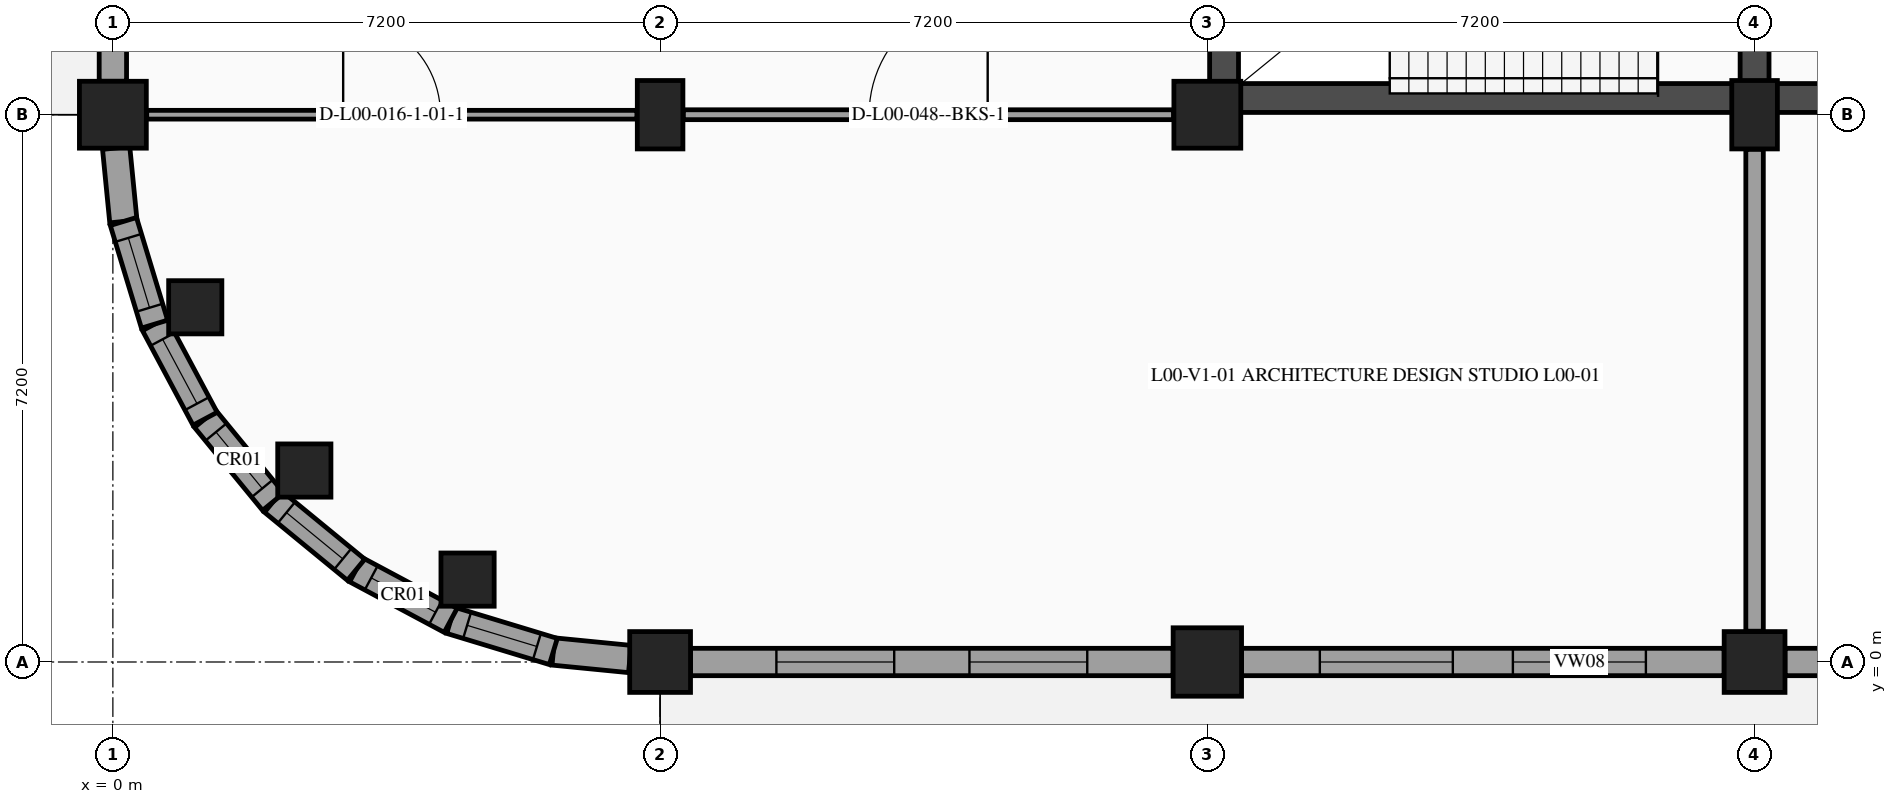
"""IFC4 building model, lengths in metres.
Left out: names, types, materials, properties, quantities, classifications, styles, units other than length and angle.
Written with IfcOpenShell. Run it as: python <this file> out.ifc"""

import sys

from ifc_helpers import new_model, si_unit, direction, frame, frame_2d, origin, origin_2d, place, context, subcontext, project, spatial, rectangle, circle, extrude, element, fill, save


model = new_model("IFC4")
c1 = context("Model", 3, precision=1e-05, world=origin(), true_north=direction((0.0, 1.0)))
c2 = subcontext(c1, "Body", "Model", "MODEL_VIEW")
j1 = project(units=[si_unit("LENGTHUNIT", "METRE"), si_unit("PLANEANGLEUNIT", "RADIAN")], contexts=[c1])
p1 = place(None, origin())
s1 = spatial("IfcSite", under=j1, at=p1, CompositionType="ELEMENT")
p2 = place(p1, origin())
s2 = spatial("IfcBuilding", under=s1, at=p2, CompositionType="ELEMENT")
p3 = place(p2, origin())
s3 = spatial("IfcBuildingStorey", under=s2, at=p3, CompositionType="ELEMENT", Elevation=0.0)
p4 = place(p3, frame((0.0, 7.2, 0.0), z_axis=(0.0, 0.0, 1.0), x_axis=(1.0, 0.0, 0.0)))
e1 = element("IfcColumn", 1, at=p4, inside=s3, PredefinedType="COLUMN", context=c2, shape_type="SweptSolid", body=[
    extrude(rectangle(XDim=0.88, YDim=0.88, at=origin_2d()), origin(), (0.0, 0.0, 1.0), 5.4),
])
p5 = place(p3, frame((7.2, 0.0, 0.0), z_axis=(0.0, 0.0, 1.0), x_axis=(1.0, 0.0, 0.0)))
e2 = element("IfcColumn", 2, at=p5, inside=s3, PredefinedType="COLUMN", context=c2, shape_type="SweptSolid", body=[
    extrude(rectangle(XDim=0.8, YDim=0.8, at=origin_2d()), origin(), (0.0, 0.0, 1.0), 5.4),
])
p6 = place(p3, frame((7.2, 7.2, 0.0), z_axis=(0.0, 0.0, 1.0), x_axis=(1.0, 0.0, 0.0)))
e3 = element("IfcColumn", 3, at=p6, inside=s3, PredefinedType="COLUMN", context=c2, shape_type="SweptSolid", body=[
    extrude(rectangle(XDim=0.6, YDim=0.9, at=origin_2d()), origin(), (0.0, 0.0, 1.0), 5.4),
])
p7 = place(p3, frame((14.4, 0.0, 0.0), z_axis=(0.0, 0.0, 1.0), x_axis=(1.0, 0.0, 0.0)))
e4 = element("IfcColumn", 4, at=p7, inside=s3, PredefinedType="COLUMN", context=c2, shape_type="SweptSolid", body=[
    extrude(rectangle(XDim=0.9, YDim=0.9, at=origin_2d()), origin(), (0.0, 0.0, 1.0), 5.4),
])
p8 = place(p3, frame((14.4, 7.2, 0.0), z_axis=(0.0, 0.0, 1.0), x_axis=(1.0, 0.0, 0.0)))
e5 = element("IfcColumn", 5, at=p8, inside=s3, PredefinedType="COLUMN", context=c2, shape_type="SweptSolid", body=[
    extrude(rectangle(XDim=0.88, YDim=0.88, at=origin_2d()), origin(), (0.0, 0.0, 1.0), 5.4),
])
p9 = place(p3, frame((21.6, 0.0, 0.0), z_axis=(0.0, 0.0, 1.0), x_axis=(1.0, 0.0, 0.0)))
e6 = element("IfcColumn", 6, at=p9, inside=s3, PredefinedType="COLUMN", context=c2, shape_type="SweptSolid", body=[
    extrude(rectangle(XDim=0.8, YDim=0.8, at=origin_2d()), origin(), (0.0, 0.0, 1.0), 5.4),
])
p10 = place(p3, frame((21.6, 7.2, 0.0), z_axis=(0.0, 0.0, 1.0), x_axis=(1.0, 0.0, 0.0)))
e7 = element("IfcColumn", 7, at=p10, inside=s3, PredefinedType="COLUMN", context=c2, shape_type="SweptSolid", body=[
    extrude(rectangle(XDim=0.6, YDim=0.9, at=origin_2d()), origin(), (0.0, 0.0, 1.0), 5.4),
])
for number, where, z_axis, x_axis in (
    (8, (1.084, 4.667, 0.0), (0.0, 0.0, 1.0), (1.0, 0.0, 0.0)),
    (9, (2.519, 2.519, 0.0), (0.0, 0.0, 1.0), (1.0, 0.0, 0.0)),
    (10, (4.667, 1.084, 0.0), (0.0, 0.0, 1.0), (1.0, 0.0, 0.0)),
):
    element("IfcColumn", number, at=place(p3, frame(where, z_axis=z_axis, x_axis=x_axis)), inside=s3, PredefinedType="COLUMN", context=c2, shape_type="SweptSolid", body=[
        extrude(circle(Radius=0.35, at=origin_2d()), origin(), (0.0, 0.0, 1.0), 5.4),
    ])
p11 = place(p3, frame((0.138, 5.795, 0.0), z_axis=(0.0, 0.0, 1.0), x_axis=(-0.098010679686, 0.995185362969, 0.0)))
e11 = element("IfcWall", 11, at=p11, inside=s3, PredefinedType="STANDARD", context=c2, shape_type="SweptSolid", body=[
    extrude(rectangle(XDim=0.971, YDim=0.36, at=frame_2d((0.486, 0.0))), origin(), (0.0, 0.0, 1.0), 5.09),
])
p12 = place(p3, frame((0.0, 7.64, 0.0), z_axis=(0.0, 0.0, 1.0), x_axis=(0.0, 1.0, 0.0)))
e12 = element("IfcWall", 12, at=p12, inside=s3, PredefinedType="STANDARD", context=c2, shape_type="SweptSolid", body=[
    extrude(rectangle(XDim=6.35, YDim=0.36, at=frame_2d((3.175, 0.0))), origin(), (0.0, 0.0, 1.0), 4.335),
])
p13 = place(p12, frame((2.125, 0.0, 0.0)))
e13 = element("IfcOpeningElement", 13, at=p13, cuts=e12, PredefinedType="OPENING", context=c2, shape_type="SweptSolid", body=[
    extrude(rectangle(XDim=2.1, YDim=2.4, at=frame_2d((1.05, 1.2))), frame((0.0, 0.19, 0.0), z_axis=(0.0, -1.0, 0.0), x_axis=(1.0, 0.0, 0.0)), (0.0, 0.0, 1.0), 0.38),
])
p14 = place(p3, frame((28.35, 0.0, 0.0), z_axis=(0.0, 0.0, 1.0), x_axis=(-1.0, 0.0, 0.0)))
e14 = element("IfcWall", 14, at=p14, inside=s3, PredefinedType="STANDARD", context=c2, shape_type="SweptSolid", body=[
    extrude(rectangle(XDim=6.35, YDim=0.36, at=frame_2d((3.175, 0.0))), origin(), (0.0, 0.0, 1.0), 4.37),
])
p15 = place(p14, frame((2.375, 0.0, 0.0)))
e15 = element("IfcOpeningElement", 15, at=p15, cuts=e14, PredefinedType="OPENING", context=c2, shape_type="SweptSolid", body=[
    extrude(rectangle(XDim=1.6, YDim=2.3, at=frame_2d((0.8, 1.15))), frame((0.0, 0.19, 0.0), z_axis=(0.0, -1.0, 0.0), x_axis=(1.0, 0.0, 0.0)), (0.0, 0.0, 1.0), 0.38),
])
p16 = place(p3, frame((21.2, 0.0, 0.0), z_axis=(0.0, 0.0, 1.0), x_axis=(-1.0, 0.0, 0.0)))
e16 = element("IfcWall", 16, at=p16, inside=s3, PredefinedType="STANDARD", context=c2, shape_type="SweptSolid", body=[
    extrude(rectangle(XDim=6.35, YDim=0.36, at=frame_2d((3.175, 0.0))), origin(), (0.0, 0.0, 1.0), 4.37),
])
p17 = place(p16, frame((1.03, 0.0, 1.15)))
e17 = element("IfcOpeningElement", 17, at=p17, cuts=e16, PredefinedType="OPENING", context=c2, shape_type="SweptSolid", body=[
    extrude(rectangle(XDim=1.75, YDim=1.4, at=frame_2d((0.875, 0.7))), frame((0.0, 0.19, 0.0), z_axis=(0.0, -1.0, 0.0), x_axis=(1.0, 0.0, 0.0)), (0.0, 0.0, 1.0), 0.38),
])
p18 = place(p16, frame((3.57, 0.0, 1.15)))
e18 = element("IfcOpeningElement", 18, at=p18, cuts=e16, PredefinedType="OPENING", context=c2, shape_type="SweptSolid", body=[
    extrude(rectangle(XDim=1.75, YDim=1.4, at=frame_2d((0.875, 0.7))), frame((0.0, 0.19, 0.0), z_axis=(0.0, -1.0, 0.0), x_axis=(1.0, 0.0, 0.0)), (0.0, 0.0, 1.0), 0.38),
])
p19 = place(p3, frame((13.95, 0.0, 0.0), z_axis=(0.0, 0.0, 1.0), x_axis=(-1.0, 0.0, 0.0)))
e19 = element("IfcWall", 19, at=p19, inside=s3, PredefinedType="STANDARD", context=c2, shape_type="SweptSolid", body=[
    extrude(rectangle(XDim=6.35, YDim=0.36, at=frame_2d((3.175, 0.0))), origin(), (0.0, 0.0, 1.0), 4.37),
])
p20 = place(p19, frame((1.13, 0.0, 1.15)))
e20 = element("IfcOpeningElement", 20, at=p20, cuts=e19, PredefinedType="OPENING", context=c2, shape_type="SweptSolid", body=[
    extrude(rectangle(XDim=1.55, YDim=1.35, at=frame_2d((0.775, 0.675))), frame((0.0, 0.19, 0.0), z_axis=(0.0, -1.0, 0.0), x_axis=(1.0, 0.0, 0.0)), (0.0, 0.0, 1.0), 0.38),
])
p21 = place(p19, frame((3.67, 0.0, 1.15)))
e21 = element("IfcOpeningElement", 21, at=p21, cuts=e19, PredefinedType="OPENING", context=c2, shape_type="SweptSolid", body=[
    extrude(rectangle(XDim=1.55, YDim=1.35, at=frame_2d((0.775, 0.675))), frame((0.0, 0.19, 0.0), z_axis=(0.0, -1.0, 0.0), x_axis=(1.0, 0.0, 0.0)), (0.0, 0.0, 1.0), 0.38),
])
p22 = place(p3, frame((6.802, 0.039, 0.0), z_axis=(0.0, 0.0, 1.0), x_axis=(-0.9951866114, 0.097998002481, 0.0)))
e22 = element("IfcWall", 22, at=p22, inside=s3, PredefinedType="STANDARD", context=c2, shape_type="SweptSolid", body=[
    extrude(rectangle(XDim=1.011, YDim=0.36, at=frame_2d((0.506, 0.0))), origin(), (0.0, 0.0, 1.0), 5.09),
])
p23 = place(p3, frame((5.795, 0.138, 0.0), z_axis=(0.0, 0.0, 1.0), x_axis=(-0.95696037757, 0.290218599957, 0.0)))
e23 = element("IfcWall", 23, at=p23, inside=s3, PredefinedType="STANDARD", context=c2, shape_type="SweptSolid", body=[
    extrude(rectangle(XDim=1.412, YDim=0.36, at=frame_2d((0.706, 0.0))), origin(), (0.0, 0.0, 1.0), 5.09),
])
p24 = place(p23, frame((0.226, 0.0, 1.0)))
e24 = element("IfcOpeningElement", 24, at=p24, cuts=e23, PredefinedType="OPENING", context=c2, shape_type="SweptSolid", body=[
    extrude(rectangle(XDim=0.96, YDim=1.4, at=frame_2d((0.48, 0.7))), frame((0.0, 0.19, 0.0), z_axis=(0.0, -1.0, 0.0), x_axis=(1.0, 0.0, 0.0)), (0.0, 0.0, 1.0), 0.38),
])
p25 = place(p3, frame((4.445, 0.548, 0.0), z_axis=(0.0, 0.0, 1.0), x_axis=(-0.881916788861, 0.471405109778, 0.0)))
e25 = element("IfcWall", 25, at=p25, inside=s3, PredefinedType="STANDARD", context=c2, shape_type="SweptSolid", body=[
    extrude(rectangle(XDim=1.411, YDim=0.36, at=frame_2d((0.706, 0.0))), origin(), (0.0, 0.0, 1.0), 5.09),
])
p26 = place(p25, frame((0.226, 0.0, 1.0)))
e26 = element("IfcOpeningElement", 26, at=p26, cuts=e25, PredefinedType="OPENING", context=c2, shape_type="SweptSolid", body=[
    extrude(rectangle(XDim=0.96, YDim=1.4, at=frame_2d((0.48, 0.7))), frame((0.0, 0.19, 0.0), z_axis=(0.0, -1.0, 0.0), x_axis=(1.0, 0.0, 0.0)), (0.0, 0.0, 1.0), 0.38),
])
p27 = place(p3, frame((3.2, 1.213, 0.0), z_axis=(0.0, 0.0, 1.0), x_axis=(-0.772977670605, 0.634433227965, 0.0)))
e27 = element("IfcWall", 27, at=p27, inside=s3, PredefinedType="STANDARD", context=c2, shape_type="SweptSolid", body=[
    extrude(rectangle(XDim=1.412, YDim=0.36, at=frame_2d((0.706, 0.0))), origin(), (0.0, 0.0, 1.0), 5.09),
])
p28 = place(p27, frame((0.226, 0.0, 1.0)))
e28 = element("IfcOpeningElement", 28, at=p28, cuts=e27, PredefinedType="OPENING", context=c2, shape_type="SweptSolid", body=[
    extrude(rectangle(XDim=0.96, YDim=1.4, at=frame_2d((0.48, 0.7))), frame((0.0, 0.19, 0.0), z_axis=(0.0, -1.0, 0.0), x_axis=(1.0, 0.0, 0.0)), (0.0, 0.0, 1.0), 0.38),
])
p29 = place(p3, frame((2.109, 2.109, 0.0), z_axis=(0.0, 0.0, 1.0), x_axis=(-0.634433227965, 0.772977670605, 0.0)))
e29 = element("IfcWall", 29, at=p29, inside=s3, PredefinedType="STANDARD", context=c2, shape_type="SweptSolid", body=[
    extrude(rectangle(XDim=1.412, YDim=0.36, at=frame_2d((0.706, 0.0))), origin(), (0.0, 0.0, 1.0), 5.09),
])
p30 = place(p29, frame((0.226, 0.0, 1.0)))
e30 = element("IfcOpeningElement", 30, at=p30, cuts=e29, PredefinedType="OPENING", context=c2, shape_type="SweptSolid", body=[
    extrude(rectangle(XDim=0.96, YDim=1.4, at=frame_2d((0.48, 0.7))), frame((0.0, 0.19, 0.0), z_axis=(0.0, -1.0, 0.0), x_axis=(1.0, 0.0, 0.0)), (0.0, 0.0, 1.0), 0.38),
])
p31 = place(p3, frame((1.213, 3.2, 0.0), z_axis=(0.0, 0.0, 1.0), x_axis=(-0.471405109778, 0.881916788861, 0.0)))
e31 = element("IfcWall", 31, at=p31, inside=s3, PredefinedType="STANDARD", context=c2, shape_type="SweptSolid", body=[
    extrude(rectangle(XDim=1.411, YDim=0.36, at=frame_2d((0.706, 0.0))), origin(), (0.0, 0.0, 1.0), 5.09),
])
p32 = place(p31, frame((0.226, 0.0, 1.0)))
e32 = element("IfcOpeningElement", 32, at=p32, cuts=e31, PredefinedType="OPENING", context=c2, shape_type="SweptSolid", body=[
    extrude(rectangle(XDim=0.96, YDim=1.4, at=frame_2d((0.48, 0.7))), frame((0.0, 0.19, 0.0), z_axis=(0.0, -1.0, 0.0), x_axis=(1.0, 0.0, 0.0)), (0.0, 0.0, 1.0), 0.38),
])
p33 = place(p3, frame((0.548, 4.445, 0.0), z_axis=(0.0, 0.0, 1.0), x_axis=(-0.290218599957, 0.95696037757, 0.0)))
e33 = element("IfcWall", 33, at=p33, inside=s3, PredefinedType="STANDARD", context=c2, shape_type="SweptSolid", body=[
    extrude(rectangle(XDim=1.412, YDim=0.36, at=frame_2d((0.706, 0.0))), origin(), (0.0, 0.0, 1.0), 5.09),
])
p34 = place(p33, frame((0.226, 0.0, 1.0)))
e34 = element("IfcOpeningElement", 34, at=p34, cuts=e33, PredefinedType="OPENING", context=c2, shape_type="SweptSolid", body=[
    extrude(rectangle(XDim=0.96, YDim=1.4, at=frame_2d((0.48, 0.7))), frame((0.0, 0.19, 0.0), z_axis=(0.0, -1.0, 0.0), x_axis=(1.0, 0.0, 0.0)), (0.0, 0.0, 1.0), 0.38),
])
p35 = place(p3, frame((14.81, 7.42, 0.0), z_axis=(0.0, 0.0, 1.0), x_axis=(1.0, 0.0, 0.0)))
e35 = element("IfcWall", 35, at=p35, inside=s3, PredefinedType="SHEAR", context=c2, shape_type="SweptSolid", body=[
    extrude(rectangle(XDim=6.6, YDim=0.38, at=frame_2d((3.3, 0.0))), origin(), (0.0, 0.0, 1.0), 5.09),
])
p36 = place(p3, frame((14.62, 14.37, 0.0), z_axis=(0.0, 0.0, 1.0), x_axis=(0.0, -1.0, 0.0)))
e36 = element("IfcWall", 36, at=p36, inside=s3, PredefinedType="SHEAR", context=c2, shape_type="SweptSolid", body=[
    extrude(rectangle(XDim=7.14, YDim=0.38, at=frame_2d((3.57, 0.0))), origin(), (0.0, 0.0, 1.0), 5.09),
])
p37 = place(p3, frame((21.6, 7.23, 0.0), z_axis=(0.0, 0.0, 1.0), x_axis=(0.0, 1.0, 0.0)))
e37 = element("IfcWall", 37, at=p37, inside=s3, PredefinedType="SHEAR", context=c2, shape_type="SweptSolid", body=[
    extrude(rectangle(XDim=7.14, YDim=0.38, at=frame_2d((3.57, 0.0))), origin(), (0.0, 0.0, 1.0), 5.09),
])
p38 = place(p37, frame((1.4, 0.0, 0.0)))
e38 = element("IfcOpeningElement", 38, at=p38, cuts=e37, PredefinedType="OPENING", context=c2, shape_type="SweptSolid", body=[
    extrude(rectangle(XDim=1.8, YDim=2.2, at=frame_2d((0.9, 1.1))), frame((0.0, 0.2, 0.0), z_axis=(0.0, -1.0, 0.0), x_axis=(1.0, 0.0, 0.0)), (0.0, 0.0, 1.0), 0.4),
])
p39 = place(p3, frame((21.79, 7.42, 0.0), z_axis=(0.0, 0.0, 1.0), x_axis=(1.0, 0.0, 0.0)))
e39 = element("IfcWall", 39, at=p39, inside=s3, PredefinedType="SHEAR", context=c2, shape_type="SweptSolid", body=[
    extrude(rectangle(XDim=6.6, YDim=0.38, at=frame_2d((3.3, 0.0))), origin(), (0.0, 0.0, 1.0), 5.09),
])
p40 = place(p39, frame((2.22, 0.0, 0.0)))
e40 = element("IfcOpeningElement", 40, at=p40, cuts=e39, PredefinedType="OPENING", context=c2, shape_type="SweptSolid", body=[
    extrude(rectangle(XDim=1.8, YDim=2.2, at=frame_2d((0.9, 1.1))), frame((0.0, 0.2, 0.0), z_axis=(0.0, -1.0, 0.0), x_axis=(1.0, 0.0, 0.0)), (0.0, 0.0, 1.0), 0.4),
])
p41 = place(p3, frame((0.445, 7.2, 0.0), z_axis=(0.0, 0.0, 1.0), x_axis=(1.0, 0.0, 0.0)))
e41 = element("IfcWall", 41, at=p41, inside=s3, PredefinedType="PARTITIONING", context=c2, shape_type="SweptSolid", body=[
    extrude(rectangle(XDim=6.45, YDim=0.115, at=frame_2d((3.225, 0.0))), origin(), (0.0, 0.0, 1.0), 4.31),
])
p42 = place(p41, frame((2.585, 0.0, 0.0)))
e42 = element("IfcOpeningElement", 42, at=p42, cuts=e41, PredefinedType="OPENING", context=c2, shape_type="SweptSolid", body=[
    extrude(rectangle(XDim=1.28, YDim=2.24, at=frame_2d((0.64, 1.12))), frame((0.0, 0.067, 0.0), z_axis=(0.0, -1.0, 0.0), x_axis=(1.0, 0.0, 0.0)), (0.0, 0.0, 1.0), 0.135),
])
p43 = place(p3, frame((7.505, 7.2, 0.0), z_axis=(0.0, 0.0, 1.0), x_axis=(1.0, 0.0, 0.0)))
e43 = element("IfcWall", 43, at=p43, inside=s3, PredefinedType="PARTITIONING", context=c2, shape_type="SweptSolid", body=[
    extrude(rectangle(XDim=6.45, YDim=0.13, at=frame_2d((3.225, 0.0))), origin(), (0.0, 0.0, 1.0), 4.34),
])
p44 = place(p43, frame((2.445, 0.0, 0.0)))
e44 = element("IfcOpeningElement", 44, at=p44, cuts=e43, PredefinedType="OPENING", context=c2, shape_type="SweptSolid", body=[
    extrude(rectangle(XDim=1.56, YDim=2.25, at=frame_2d((0.78, 1.125))), frame((0.0, 0.075, 0.0), z_axis=(0.0, -1.0, 0.0), x_axis=(1.0, 0.0, 0.0)), (0.0, 0.0, 1.0), 0.15),
])
p45 = place(p3, frame((21.6, 0.405, 0.0), z_axis=(0.0, 0.0, 1.0), x_axis=(0.0, 1.0, 0.0)))
e45 = element("IfcWall", 45, at=p45, inside=s3, PredefinedType="PARTITIONING", context=c2, shape_type="SweptSolid", body=[
    extrude(rectangle(XDim=6.34, YDim=0.23, at=frame_2d((3.17, 0.0))), origin(), (0.0, 0.0, 1.0), 4.455),
])
p46 = place(p17, origin())
e46 = element("IfcWindow", 46, at=p46, inside=s3, PartitioningType="SINGLE_PANEL", PredefinedType="WINDOW", context=c2, shape_type="SweptSolid", body=[
    extrude(rectangle(XDim=1.75, YDim=1.4, at=frame_2d((0.875, 0.7))), frame((0.0, -0.08, 0.0), z_axis=(0.0, -1.0, 0.0), x_axis=(1.0, 0.0, 0.0)), (0.0, 0.0, 1.0), 0.06),
])
fill(e17, e46)
p47 = place(p18, origin())
e47 = element("IfcWindow", 47, at=p47, inside=s3, PartitioningType="SINGLE_PANEL", PredefinedType="WINDOW", context=c2, shape_type="SweptSolid", body=[
    extrude(rectangle(XDim=1.75, YDim=1.4, at=frame_2d((0.875, 0.7))), frame((0.0, -0.08, 0.0), z_axis=(0.0, -1.0, 0.0), x_axis=(1.0, 0.0, 0.0)), (0.0, 0.0, 1.0), 0.06),
])
fill(e18, e47)
p48 = place(p20, origin())
e48 = element("IfcWindow", 48, at=p48, inside=s3, PartitioningType="SINGLE_PANEL", PredefinedType="WINDOW", context=c2, shape_type="SweptSolid", body=[
    extrude(rectangle(XDim=1.55, YDim=1.35, at=frame_2d((0.775, 0.675))), frame((0.0, -0.08, 0.0), z_axis=(0.0, -1.0, 0.0), x_axis=(1.0, 0.0, 0.0)), (0.0, 0.0, 1.0), 0.06),
])
fill(e20, e48)
p49 = place(p21, origin())
e49 = element("IfcWindow", 49, at=p49, inside=s3, PartitioningType="SINGLE_PANEL", PredefinedType="WINDOW", context=c2, shape_type="SweptSolid", body=[
    extrude(rectangle(XDim=1.55, YDim=1.35, at=frame_2d((0.775, 0.675))), frame((0.0, -0.08, 0.0), z_axis=(0.0, -1.0, 0.0), x_axis=(1.0, 0.0, 0.0)), (0.0, 0.0, 1.0), 0.06),
])
fill(e21, e49)
p50 = place(p24, origin())
e50 = element("IfcWindow", 50, at=p50, inside=s3, PartitioningType="SINGLE_PANEL", PredefinedType="WINDOW", context=c2, shape_type="SweptSolid", body=[
    extrude(rectangle(XDim=0.96, YDim=1.4, at=frame_2d((0.48, 0.7))), frame((0.0, -0.01, 0.0), z_axis=(0.0, -1.0, 0.0), x_axis=(1.0, 0.0, 0.0)), (0.0, 0.0, 1.0), 0.06),
])
fill(e24, e50)
p51 = place(p26, origin())
e51 = element("IfcWindow", 51, at=p51, inside=s3, PartitioningType="SINGLE_PANEL", PredefinedType="WINDOW", context=c2, shape_type="SweptSolid", body=[
    extrude(rectangle(XDim=0.96, YDim=1.4, at=frame_2d((0.48, 0.7))), frame((0.0, -0.01, 0.0), z_axis=(0.0, -1.0, 0.0), x_axis=(1.0, 0.0, 0.0)), (0.0, 0.0, 1.0), 0.06),
])
fill(e26, e51)
p52 = place(p28, origin())
e52 = element("IfcWindow", 52, at=p52, inside=s3, PartitioningType="SINGLE_PANEL", PredefinedType="WINDOW", context=c2, shape_type="SweptSolid", body=[
    extrude(rectangle(XDim=0.96, YDim=1.4, at=frame_2d((0.48, 0.7))), frame((0.0, -0.01, 0.0), z_axis=(0.0, -1.0, 0.0), x_axis=(1.0, 0.0, 0.0)), (0.0, 0.0, 1.0), 0.06),
])
fill(e28, e52)
p53 = place(p30, origin())
e53 = element("IfcWindow", 53, at=p53, inside=s3, PartitioningType="SINGLE_PANEL", PredefinedType="WINDOW", context=c2, shape_type="SweptSolid", body=[
    extrude(rectangle(XDim=0.96, YDim=1.4, at=frame_2d((0.48, 0.7))), frame((0.0, -0.01, 0.0), z_axis=(0.0, -1.0, 0.0), x_axis=(1.0, 0.0, 0.0)), (0.0, 0.0, 1.0), 0.06),
])
fill(e30, e53)
p54 = place(p32, origin())
e54 = element("IfcWindow", 54, at=p54, inside=s3, PartitioningType="SINGLE_PANEL", PredefinedType="WINDOW", context=c2, shape_type="SweptSolid", body=[
    extrude(rectangle(XDim=0.96, YDim=1.4, at=frame_2d((0.48, 0.7))), frame((0.0, -0.01, 0.0), z_axis=(0.0, -1.0, 0.0), x_axis=(1.0, 0.0, 0.0)), (0.0, 0.0, 1.0), 0.06),
])
fill(e32, e54)
p55 = place(p34, origin())
e55 = element("IfcWindow", 55, at=p55, inside=s3, PartitioningType="SINGLE_PANEL", PredefinedType="WINDOW", context=c2, shape_type="SweptSolid", body=[
    extrude(rectangle(XDim=0.96, YDim=1.4, at=frame_2d((0.48, 0.7))), frame((0.0, -0.01, 0.0), z_axis=(0.0, -1.0, 0.0), x_axis=(1.0, 0.0, 0.0)), (0.0, 0.0, 1.0), 0.06),
])
fill(e34, e55)
p56 = place(p42, origin())
e56 = element("IfcDoor", 56, at=p56, inside=s3, OperationType="SINGLE_SWING_LEFT", PredefinedType="DOOR", context=c2, shape_type="SweptSolid", body=[
    extrude(rectangle(XDim=1.28, YDim=2.24, at=frame_2d((0.64, 1.12))), frame((0.0, 0.025, 0.0), z_axis=(0.0, -1.0, 0.0), x_axis=(1.0, 0.0, 0.0)), (0.0, 0.0, 1.0), 0.05),
])
fill(e42, e56)
p57 = place(p44, origin())
e57 = element("IfcDoor", 57, at=p57, inside=s3, OperationType="SINGLE_SWING_RIGHT", PredefinedType="DOOR", context=c2, shape_type="SweptSolid", body=[
    extrude(rectangle(XDim=1.56, YDim=2.25, at=frame_2d((0.78, 1.125))), frame((0.0, 0.025, 0.0), z_axis=(0.0, -1.0, 0.0), x_axis=(1.0, 0.0, 0.0)), (0.0, 0.0, 1.0), 0.05),
])
fill(e44, e57)
save(model, sys.argv[1])
